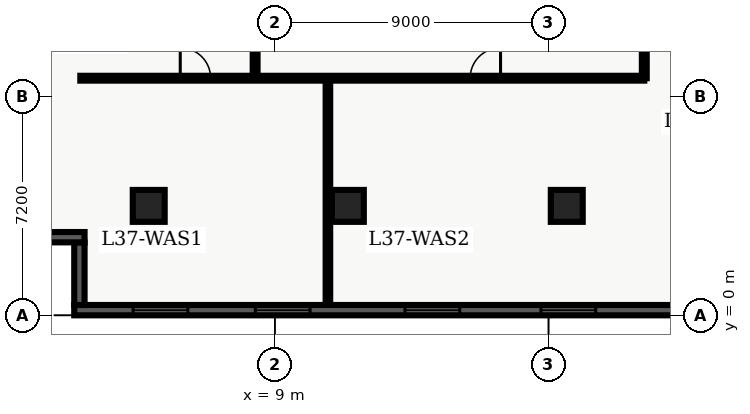
"""IFC4 building model, lengths in metres.
Left out: names, types, materials, properties, quantities, classifications, styles, units other than length and angle.
Written with IfcOpenShell. Run it as: python <this file> out.ifc"""

import sys

from ifc_helpers import new_model, entity, si_unit, converted_unit, direction, frame, origin_with_axes, origin_2d_with_axis, place, context, subcontext, project, spatial, polyline, rectangle, outline, extrude, element, fill, save


model = new_model("IFC4")
c1 = context("Model", 3, precision=1e-05, world=origin_with_axes(), true_north=direction((0.0, 1.0)))
c2 = subcontext(c1, "Body", "Model", "MODEL_VIEW")
j1 = project(units=[si_unit("LENGTHUNIT", "METRE"), converted_unit("PLANEANGLEUNIT", "DEGREE", entity("IfcPlaneAngleMeasure", 0.017), si_unit("PLANEANGLEUNIT", "RADIAN"), dimensions=[0, 0, 0, 0, 0, 0, 0])], contexts=[c1])
p1 = place(None, origin_with_axes())
s1 = spatial("IfcSite", under=j1, at=p1, CompositionType="ELEMENT")
p2 = place(p1, origin_with_axes())
s2 = spatial("IfcBuilding", under=s1, at=p2, CompositionType="ELEMENT")
p3 = place(p2, frame((0.0, 0.0, 152.4), z_axis=(0.0, 0.0, 1.0), x_axis=(1.0, 0.0, 0.0)))
s3 = spatial("IfcBuildingStorey", under=s2, at=p3, CompositionType="ELEMENT", Elevation=152.4)
for number, where, z_axis, x_axis in (
    (1, (11.4, 3.6, 0.0), (0.0, 0.0, 1.0), (1.0, 0.0, 0.0)),
    (2, (18.6, 3.6, 0.0), (0.0, 0.0, 1.0), (1.0, 0.0, 0.0)),
    (3, (4.85, 3.6, 0.0), (0.0, 0.0, 1.0), (1.0, 0.0, 0.0)),
):
    element("IfcColumn", number, at=place(p3, frame(where, z_axis=z_axis, x_axis=x_axis)), inside=s3, PredefinedType="COLUMN", context=c2, shape_type="SweptSolid", body=[
        extrude(rectangle(XDim=1.05, YDim=1.05, at=origin_2d_with_axis()), origin_with_axes(), (0.0, 0.0, 1.0), 3.9),
    ])
p4 = place(p3, frame((2.6, 7.8, 0.0), z_axis=(0.0, 0.0, 1.0), x_axis=(1.0, 0.0, 0.0)))
e4 = element("IfcWall", 4, at=p4, inside=s3, PredefinedType="PARTITIONING", context=c2, shape_type="SweptSolid", body=[
    extrude(outline(polyline([(0.0, -0.08), (18.55, -0.08), (18.55, 0.08), (0.0, 0.08), (0.0, -0.08)])), origin_with_axes(), (0.0, 0.0, 1.0), 2.7),
])
p5 = place(p4, frame((3.787, 0.0, 0.0), z_axis=(0.0, 0.0, 1.0), x_axis=(1.0, 0.0, 0.0)))
e5 = element("IfcOpeningElement", 5, at=p5, cuts=e4, PredefinedType="OPENING", context=c2, shape_type="SweptSolid", body=[
    extrude(rectangle(XDim=1.0, YDim=0.18, at=origin_2d_with_axis()), origin_with_axes(), (0.0, 0.0, 1.0), 2.15),
])
p6 = place(p4, frame((13.322, 0.0, 0.0), z_axis=(0.0, 0.0, 1.0), x_axis=(1.0, 0.0, 0.0)))
e6 = element("IfcOpeningElement", 6, at=p6, cuts=e4, PredefinedType="OPENING", context=c2, shape_type="SweptSolid", body=[
    extrude(rectangle(XDim=1.0, YDim=0.18, at=origin_2d_with_axis()), origin_with_axes(), (0.0, 0.0, 1.0), 2.15),
])
p7 = place(p3, frame((21.15, 7.8, 0.0), z_axis=(0.0, 0.0, 1.0), x_axis=(0.0, 1.0, 0.0)))
e7 = element("IfcWall", 7, at=p7, inside=s3, PredefinedType="PARTITIONING", context=c2, shape_type="SweptSolid", body=[
    extrude(outline(polyline([(0.0, -0.08), (32.7, -0.08), (32.7, 0.08), (0.0, 0.08), (0.0, -0.08)])), origin_with_axes(), (0.0, 0.0, 1.0), 2.7),
])
p8 = place(p7, frame((5.775, 0.0, 0.0), z_axis=(0.0, 0.0, 1.0), x_axis=(1.0, 0.0, 0.0)))
e8 = element("IfcOpeningElement", 8, at=p8, cuts=e7, PredefinedType="OPENING", context=c2, shape_type="SweptSolid", body=[
    extrude(rectangle(XDim=1.05, YDim=0.18, at=origin_2d_with_axis()), origin_with_axes(), (0.0, 0.0, 1.0), 2.15),
])
p9 = place(p3, frame((8.35, 7.8, 0.0), z_axis=(0.0, 0.0, 1.0), x_axis=(0.0, 1.0, 0.0)))
e9 = element("IfcWall", 9, at=p9, inside=s3, PredefinedType="PARTITIONING", context=c2, shape_type="SweptSolid", body=[
    extrude(outline(polyline([(0.0, -0.08), (12.6, -0.08), (12.6, 0.08), (0.0, 0.08), (0.0, -0.08)])), origin_with_axes(), (0.0, 0.0, 1.0), 2.7),
])
p10 = place(p9, frame((2.92, 0.0, 0.0), z_axis=(0.0, 0.0, 1.0), x_axis=(1.0, 0.0, 0.0)))
e10 = element("IfcOpeningElement", 10, at=p10, cuts=e9, PredefinedType="OPENING", context=c2, shape_type="SweptSolid", body=[
    extrude(rectangle(XDim=1.0, YDim=0.18, at=origin_2d_with_axis()), origin_with_axes(), (0.0, 0.0, 1.0), 2.15),
])
p11 = place(p9, frame((9.115, 0.0, 0.0), z_axis=(0.0, 0.0, 1.0), x_axis=(1.0, 0.0, 0.0)))
e11 = element("IfcOpeningElement", 11, at=p11, cuts=e9, PredefinedType="OPENING", context=c2, shape_type="SweptSolid", body=[
    extrude(rectangle(XDim=1.0, YDim=0.18, at=origin_2d_with_axis()), origin_with_axes(), (0.0, 0.0, 1.0), 2.15),
])
p12 = place(p3, frame((10.744, 0.335, 0.0), z_axis=(0.0, 0.0, 1.0), x_axis=(0.0, 1.0, 0.0)))
e12 = element("IfcWall", 12, at=p12, inside=s3, PredefinedType="PARTITIONING", context=c2, shape_type="SweptSolid", body=[
    extrude(outline(polyline([(0.0, -0.075), (7.365, -0.075), (7.365, 0.075), (0.0, 0.075), (0.0, -0.075)])), origin_with_axes(), (0.0, 0.0, 1.0), 2.7),
])
p13 = place(p3, frame((57.26, 0.17, 0.0), z_axis=(0.0, 0.0, 1.0), x_axis=(-1.0, 0.0, 0.0)))
e13 = element("IfcWall", 13, at=p13, inside=s3, PredefinedType="SOLIDWALL", context=c2, shape_type="SweptSolid", body=[
    extrude(outline(polyline([(0.0, -0.17), (54.86, -0.17), (54.86, 0.17), (0.0, 0.17), (0.0, -0.17)])), origin_with_axes(), (0.0, 0.0, 1.0), 3.66),
])
p14 = place(p13, frame((2.836, 0.0, 0.45), z_axis=(0.0, 0.0, 1.0), x_axis=(1.0, 0.0, 0.0)))
e14 = element("IfcOpeningElement", 14, at=p14, cuts=e13, PredefinedType="OPENING", context=c2, shape_type="SweptSolid", body=[
    extrude(rectangle(XDim=1.8, YDim=0.36, at=origin_2d_with_axis()), origin_with_axes(), (0.0, 0.0, 1.0), 2.1),
])
p15 = place(p13, frame((7.307, 0.0, 0.45), z_axis=(0.0, 0.0, 1.0), x_axis=(1.0, 0.0, 0.0)))
e15 = element("IfcOpeningElement", 15, at=p15, cuts=e13, PredefinedType="OPENING", context=c2, shape_type="SweptSolid", body=[
    extrude(rectangle(XDim=1.8, YDim=0.36, at=origin_2d_with_axis()), origin_with_axes(), (0.0, 0.0, 1.0), 2.1),
])
p16 = place(p13, frame((11.779, 0.0, 0.45), z_axis=(0.0, 0.0, 1.0), x_axis=(1.0, 0.0, 0.0)))
e16 = element("IfcOpeningElement", 16, at=p16, cuts=e13, PredefinedType="OPENING", context=c2, shape_type="SweptSolid", body=[
    extrude(rectangle(XDim=1.8, YDim=0.36, at=origin_2d_with_axis()), origin_with_axes(), (0.0, 0.0, 1.0), 2.1),
])
p17 = place(p13, frame((16.251, 0.0, 0.45), z_axis=(0.0, 0.0, 1.0), x_axis=(1.0, 0.0, 0.0)))
e17 = element("IfcOpeningElement", 17, at=p17, cuts=e13, PredefinedType="OPENING", context=c2, shape_type="SweptSolid", body=[
    extrude(rectangle(XDim=1.8, YDim=0.36, at=origin_2d_with_axis()), origin_with_axes(), (0.0, 0.0, 1.0), 2.1),
])
p18 = place(p13, frame((20.723, 0.0, 0.45), z_axis=(0.0, 0.0, 1.0), x_axis=(1.0, 0.0, 0.0)))
e18 = element("IfcOpeningElement", 18, at=p18, cuts=e13, PredefinedType="OPENING", context=c2, shape_type="SweptSolid", body=[
    extrude(rectangle(XDim=1.8, YDim=0.36, at=origin_2d_with_axis()), origin_with_axes(), (0.0, 0.0, 1.0), 2.1),
])
p19 = place(p13, frame((25.194, 0.0, 0.45), z_axis=(0.0, 0.0, 1.0), x_axis=(1.0, 0.0, 0.0)))
e19 = element("IfcOpeningElement", 19, at=p19, cuts=e13, PredefinedType="OPENING", context=c2, shape_type="SweptSolid", body=[
    extrude(rectangle(XDim=1.8, YDim=0.36, at=origin_2d_with_axis()), origin_with_axes(), (0.0, 0.0, 1.0), 2.1),
])
p20 = place(p13, frame((29.666, 0.0, 0.45), z_axis=(0.0, 0.0, 1.0), x_axis=(1.0, 0.0, 0.0)))
e20 = element("IfcOpeningElement", 20, at=p20, cuts=e13, PredefinedType="OPENING", context=c2, shape_type="SweptSolid", body=[
    extrude(rectangle(XDim=1.8, YDim=0.36, at=origin_2d_with_axis()), origin_with_axes(), (0.0, 0.0, 1.0), 2.1),
])
p21 = place(p13, frame((34.138, 0.0, 0.45), z_axis=(0.0, 0.0, 1.0), x_axis=(1.0, 0.0, 0.0)))
e21 = element("IfcOpeningElement", 21, at=p21, cuts=e13, PredefinedType="OPENING", context=c2, shape_type="SweptSolid", body=[
    extrude(rectangle(XDim=1.8, YDim=0.36, at=origin_2d_with_axis()), origin_with_axes(), (0.0, 0.0, 1.0), 2.1),
])
p22 = place(p13, frame((38.609, 0.0, 0.45), z_axis=(0.0, 0.0, 1.0), x_axis=(1.0, 0.0, 0.0)))
e22 = element("IfcOpeningElement", 22, at=p22, cuts=e13, PredefinedType="OPENING", context=c2, shape_type="SweptSolid", body=[
    extrude(rectangle(XDim=1.8, YDim=0.36, at=origin_2d_with_axis()), origin_with_axes(), (0.0, 0.0, 1.0), 2.1),
])
p23 = place(p13, frame((43.081, 0.0, 0.45), z_axis=(0.0, 0.0, 1.0), x_axis=(1.0, 0.0, 0.0)))
e23 = element("IfcOpeningElement", 23, at=p23, cuts=e13, PredefinedType="OPENING", context=c2, shape_type="SweptSolid", body=[
    extrude(rectangle(XDim=1.8, YDim=0.36, at=origin_2d_with_axis()), origin_with_axes(), (0.0, 0.0, 1.0), 2.1),
])
p24 = place(p13, frame((48.003, 0.0, 0.45), z_axis=(0.0, 0.0, 1.0), x_axis=(1.0, 0.0, 0.0)))
e24 = element("IfcOpeningElement", 24, at=p24, cuts=e13, PredefinedType="OPENING", context=c2, shape_type="SweptSolid", body=[
    extrude(rectangle(XDim=1.8, YDim=0.36, at=origin_2d_with_axis()), origin_with_axes(), (0.0, 0.0, 1.0), 2.1),
])
p25 = place(p13, frame((52.024, 0.0, 0.45), z_axis=(0.0, 0.0, 1.0), x_axis=(1.0, 0.0, 0.0)))
e25 = element("IfcOpeningElement", 25, at=p25, cuts=e13, PredefinedType="OPENING", context=c2, shape_type="SweptSolid", body=[
    extrude(rectangle(XDim=1.8, YDim=0.36, at=origin_2d_with_axis()), origin_with_axes(), (0.0, 0.0, 1.0), 2.1),
])
p26 = place(p3, frame((2.57, 0.34, 0.0), z_axis=(0.0, 0.0, 1.0), x_axis=(0.0, 1.0, 0.0)))
e26 = element("IfcWall", 26, at=p26, inside=s3, PredefinedType="SOLIDWALL", context=c2, shape_type="SweptSolid", body=[
    extrude(outline(polyline([(0.0, -0.17), (2.06, -0.17), (2.06, 0.17), (0.0, 0.17), (0.0, -0.17)])), origin_with_axes(), (0.0, 0.0, 1.0), 3.66),
])
p27 = place(p3, frame((2.74, 2.57, 0.0), z_axis=(0.0, 0.0, 1.0), x_axis=(-1.0, 0.0, 0.0)))
e27 = element("IfcWall", 27, at=p27, inside=s3, PredefinedType="SOLIDWALL", context=c2, shape_type="SweptSolid", body=[
    extrude(outline(polyline([(0.0, -0.17), (2.74, -0.17), (2.74, 0.17), (0.0, 0.17), (0.0, -0.17)])), origin_with_axes(), (0.0, 0.0, 1.0), 3.66),
])
p28 = place(p4, frame((3.787, 0.0, 0.0), z_axis=(0.0, 0.0, 1.0), x_axis=(1.0, 0.0, 0.0)))
e28 = element("IfcDoor", 28, at=p28, inside=s3, OperationType="SINGLE_SWING_LEFT", PredefinedType="DOOR", context=c2, shape_type="SweptSolid", body=[
    extrude(rectangle(XDim=1.0, YDim=0.09, at=origin_2d_with_axis()), origin_with_axes(), (0.0, 0.0, 1.0), 2.15),
])
fill(e5, e28)
p29 = place(p4, frame((13.322, 0.0, 0.0), z_axis=(0.0, 0.0, 1.0), x_axis=(1.0, 0.0, 0.0)))
e29 = element("IfcDoor", 29, at=p29, inside=s3, OperationType="SINGLE_SWING_RIGHT", PredefinedType="DOOR", context=c2, shape_type="SweptSolid", body=[
    extrude(rectangle(XDim=1.0, YDim=0.09, at=origin_2d_with_axis()), origin_with_axes(), (0.0, 0.0, 1.0), 2.15),
])
fill(e6, e29)
p30 = place(p13, frame((38.609, 0.0, 0.45), z_axis=(0.0, 0.0, 1.0), x_axis=(1.0, 0.0, 0.0)))
e30 = element("IfcWindow", 30, at=p30, inside=s3, PredefinedType="WINDOW", context=c2, shape_type="SweptSolid", body=[
    extrude(rectangle(XDim=1.8, YDim=0.09, at=origin_2d_with_axis()), origin_with_axes(), (0.0, 0.0, 1.0), 2.1),
])
fill(e22, e30)
p31 = place(p13, frame((43.081, 0.0, 0.45), z_axis=(0.0, 0.0, 1.0), x_axis=(1.0, 0.0, 0.0)))
e31 = element("IfcWindow", 31, at=p31, inside=s3, PredefinedType="WINDOW", context=c2, shape_type="SweptSolid", body=[
    extrude(rectangle(XDim=1.8, YDim=0.09, at=origin_2d_with_axis()), origin_with_axes(), (0.0, 0.0, 1.0), 2.1),
])
fill(e23, e31)
p32 = place(p13, frame((48.003, 0.0, 0.45), z_axis=(0.0, 0.0, 1.0), x_axis=(1.0, 0.0, 0.0)))
e32 = element("IfcWindow", 32, at=p32, inside=s3, PredefinedType="WINDOW", context=c2, shape_type="SweptSolid", body=[
    extrude(rectangle(XDim=1.8, YDim=0.09, at=origin_2d_with_axis()), origin_with_axes(), (0.0, 0.0, 1.0), 2.1),
])
fill(e24, e32)
p33 = place(p13, frame((52.024, 0.0, 0.45), z_axis=(0.0, 0.0, 1.0), x_axis=(1.0, 0.0, 0.0)))
e33 = element("IfcWindow", 33, at=p33, inside=s3, PredefinedType="WINDOW", context=c2, shape_type="SweptSolid", body=[
    extrude(rectangle(XDim=1.8, YDim=0.09, at=origin_2d_with_axis()), origin_with_axes(), (0.0, 0.0, 1.0), 2.1),
])
fill(e25, e33)
save(model, sys.argv[1])
